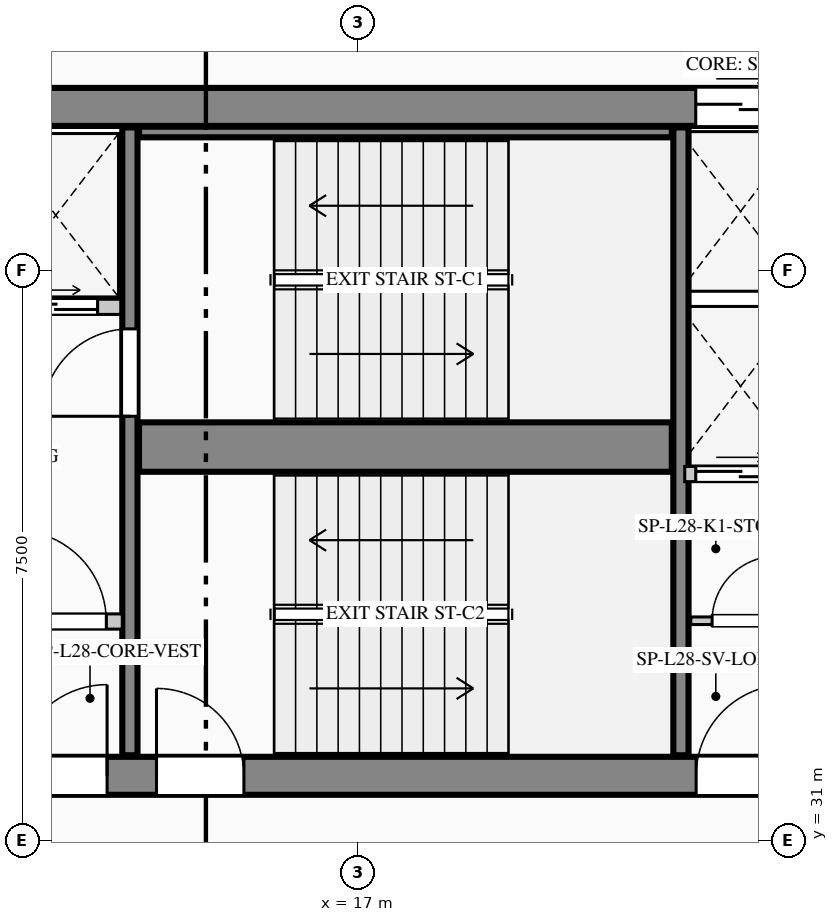
"""IFC4 building model, lengths in metres.
Left out: names, types, materials, properties, quantities, classifications, styles, units other than length and angle.
Written with IfcOpenShell. Run it as: python <this file> out.ifc"""

import sys

from ifc_helpers import new_model, si_unit, direction, frame, frame_2d, origin, place, context, subcontext, project, spatial, rectangle, extrude, element, fill, save


model = new_model("IFC4")
c1 = context("Model", 3, precision=1e-05, world=origin(), true_north=direction((0.0, 1.0)))
c2 = subcontext(c1, "Body", "Model", "MODEL_VIEW")
j1 = project(units=[si_unit("LENGTHUNIT", "METRE"), si_unit("PLANEANGLEUNIT", "RADIAN")], contexts=[c1])
p1 = place(None, origin())
s1 = spatial("IfcSite", under=j1, at=p1, CompositionType="ELEMENT")
p2 = place(p1, origin())
s2 = spatial("IfcBuilding", under=s1, at=p2, CompositionType="ELEMENT")
p3 = place(p2, frame((0.0, 0.0, 123.25)))
s3 = spatial("IfcBuildingStorey", under=s2, at=p3, CompositionType="ELEMENT", Elevation=123.25)
p4 = place(p3, frame((5.5, 40.65, 0.0), z_axis=(0.0, 0.0, 1.0), x_axis=(1.0, 0.0, 0.0)))
e1 = element("IfcWall", 1, at=p4, inside=s3, PredefinedType="SHEAR", context=c2, shape_type="SweptSolid", body=[
    extrude(rectangle(XDim=17.85, YDim=0.5, at=frame_2d((8.925, 0.0))), origin(), (0.0, 0.0, 1.0), 3.95),
])
p5 = place(p4, frame((15.945, 0.0, 0.0)))
e2 = element("IfcOpeningElement", 2, at=p5, cuts=e1, PredefinedType="OPENING", context=c2, shape_type="SweptSolid", body=[
    extrude(rectangle(XDim=1.18, YDim=2.25, at=frame_2d((0.59, 1.125))), frame((0.0, 0.26, 0.0), z_axis=(0.0, -1.0, 0.0), x_axis=(1.0, 0.0, 0.0)), (0.0, 0.0, 1.0), 0.52),
])
p6 = place(p3, frame((5.5, 31.85, 0.0), z_axis=(0.0, 0.0, 1.0), x_axis=(1.0, 0.0, 0.0)))
e3 = element("IfcWall", 3, at=p6, inside=s3, PredefinedType="SHEAR", context=c2, shape_type="SweptSolid", body=[
    extrude(rectangle(XDim=17.85, YDim=0.5, at=frame_2d((8.925, 0.0))), origin(), (0.0, 0.0, 1.0), 3.95),
])
p7 = place(p6, frame((3.15, 0.0, 0.0)))
e4 = element("IfcOpeningElement", 4, at=p7, cuts=e3, PredefinedType="OPENING", context=c2, shape_type="SweptSolid", body=[
    extrude(rectangle(XDim=1.2, YDim=2.2, at=frame_2d((0.6, 1.1))), frame((0.0, 0.26, 0.0), z_axis=(0.0, -1.0, 0.0), x_axis=(1.0, 0.0, 0.0)), (0.0, 0.0, 1.0), 0.52),
])
p8 = place(p6, frame((7.0, 0.0, 0.0)))
e5 = element("IfcOpeningElement", 5, at=p8, cuts=e3, PredefinedType="OPENING", context=c2, shape_type="SweptSolid", body=[
    extrude(rectangle(XDim=1.2, YDim=2.2, at=frame_2d((0.6, 1.1))), frame((0.0, 0.26, 0.0), z_axis=(0.0, -1.0, 0.0), x_axis=(1.0, 0.0, 0.0)), (0.0, 0.0, 1.0), 0.52),
])
p9 = place(p6, frame((8.85, 0.0, 0.0)))
e6 = element("IfcOpeningElement", 6, at=p9, cuts=e3, PredefinedType="OPENING", context=c2, shape_type="SweptSolid", body=[
    extrude(rectangle(XDim=1.15, YDim=2.2, at=frame_2d((0.575, 1.1))), frame((0.0, 0.26, 0.0), z_axis=(0.0, -1.0, 0.0), x_axis=(1.0, 0.0, 0.0)), (0.0, 0.0, 1.0), 0.52),
])
p10 = place(p6, frame((15.95, 0.0, 0.0)))
e7 = element("IfcOpeningElement", 7, at=p10, cuts=e3, PredefinedType="OPENING", context=c2, shape_type="SweptSolid", body=[
    extrude(rectangle(XDim=1.2, YDim=2.2, at=frame_2d((0.6, 1.1))), frame((0.0, 0.26, 0.0), z_axis=(0.0, -1.0, 0.0), x_axis=(1.0, 0.0, 0.0)), (0.0, 0.0, 1.0), 0.52),
])
p11 = place(p3, frame((14.0, 32.12, 0.0), z_axis=(0.0, 0.0, 1.0), x_axis=(0.0, 1.0, 0.0)))
e8 = element("IfcWall", 8, at=p11, inside=s3, PredefinedType="SHEAR", context=c2, shape_type="SweptSolid", body=[
    extrude(rectangle(XDim=8.26, YDim=0.2, at=frame_2d((4.13, 0.0))), origin(), (0.0, 0.0, 1.0), 3.95),
])
p12 = place(p11, frame((4.46, 0.0, 0.0)))
e9 = element("IfcOpeningElement", 9, at=p12, cuts=e8, PredefinedType="OPENING", context=c2, shape_type="SweptSolid", body=[
    extrude(rectangle(XDim=1.15, YDim=2.2, at=frame_2d((0.575, 1.1))), frame((0.0, 0.11, 0.0), z_axis=(0.0, -1.0, 0.0), x_axis=(1.0, 0.0, 0.0)), (0.0, 0.0, 1.0), 0.22),
])
p13 = place(p3, frame((14.12, 36.175, 0.0), z_axis=(0.0, 0.0, 1.0), x_axis=(1.0, 0.0, 0.0)))
e10 = element("IfcWall", 10, at=p13, inside=s3, PredefinedType="SHEAR", context=c2, shape_type="SweptSolid", body=[
    extrude(rectangle(XDim=7.01, YDim=0.65, at=frame_2d((3.505, 0.0))), origin(), (0.0, 0.0, 1.0), 3.95),
])
p14 = place(p3, frame((21.25, 32.12, 0.0), z_axis=(0.0, 0.0, 1.0), x_axis=(0.0, 1.0, 0.0)))
e11 = element("IfcWall", 11, at=p14, inside=s3, PredefinedType="SHEAR", context=c2, shape_type="SweptSolid", body=[
    extrude(rectangle(XDim=8.26, YDim=0.2, at=frame_2d((4.13, 0.0))), origin(), (0.0, 0.0, 1.0), 3.95),
])
p15 = place(p3, frame((14.12, 40.32, 0.0), z_axis=(0.0, 0.0, 1.0), x_axis=(1.0, 0.0, 0.0)))
e12 = element("IfcWall", 12, at=p15, inside=s3, PredefinedType="SHEAR", context=c2, shape_type="SweptSolid", body=[
    extrude(rectangle(XDim=7.01, YDim=0.14, at=frame_2d((3.505, 0.0))), origin(), (0.0, 0.0, 1.0), 3.95),
])
p16 = place(p3, frame((10.34, 38.02, 0.0), z_axis=(0.0, 0.0, 1.0), x_axis=(1.0, 0.0, 0.0)))
e13 = element("IfcWall", 13, at=p16, inside=s3, PredefinedType="PARTITIONING", context=c2, shape_type="SweptSolid", body=[
    extrude(rectangle(XDim=3.54, YDim=0.2, at=frame_2d((1.77, 0.0))), origin(), (0.0, 0.0, 1.0), 3.69),
])
p17 = place(p16, frame((0.285, 0.0, 0.0)))
e14 = element("IfcOpeningElement", 14, at=p17, cuts=e13, PredefinedType="OPENING", context=c2, shape_type="SweptSolid", body=[
    extrude(rectangle(XDim=1.1, YDim=2.2, at=frame_2d((0.55, 1.1))), frame((0.0, 0.11, 0.0), z_axis=(0.0, -1.0, 0.0), x_axis=(1.0, 0.0, 0.0)), (0.0, 0.0, 1.0), 0.22),
])
p18 = place(p16, frame((2.135, 0.0, 0.0)))
e15 = element("IfcOpeningElement", 15, at=p18, cuts=e13, PredefinedType="OPENING", context=c2, shape_type="SweptSolid", body=[
    extrude(rectangle(XDim=1.1, YDim=2.2, at=frame_2d((0.55, 1.1))), frame((0.0, 0.11, 0.0), z_axis=(0.0, -1.0, 0.0), x_axis=(1.0, 0.0, 0.0)), (0.0, 0.0, 1.0), 0.22),
])
p19 = place(p3, frame((10.34, 33.88, 0.0), z_axis=(0.0, 0.0, 1.0), x_axis=(1.0, 0.0, 0.0)))
e16 = element("IfcWall", 16, at=p19, inside=s3, PredefinedType="PARTITIONING", context=c2, shape_type="SweptSolid", body=[
    extrude(rectangle(XDim=3.56, YDim=0.2, at=frame_2d((1.78, 0.0))), origin(), (0.0, 0.0, 1.0), 3.69),
])
p20 = place(p19, frame((2.15, 0.0, 0.0)))
e17 = element("IfcOpeningElement", 17, at=p20, cuts=e16, PredefinedType="OPENING", context=c2, shape_type="SweptSolid", body=[
    extrude(rectangle(XDim=1.2, YDim=2.2, at=frame_2d((0.6, 1.1))), frame((0.0, 0.11, 0.0), z_axis=(0.0, -1.0, 0.0), x_axis=(1.0, 0.0, 0.0)), (0.0, 0.0, 1.0), 0.22),
])
p21 = place(p3, frame((21.38, 33.89, 0.0), z_axis=(0.0, 0.0, 1.0), x_axis=(1.0, 0.0, 0.0)))
e18 = element("IfcWall", 18, at=p21, inside=s3, PredefinedType="PARTITIONING", context=c2, shape_type="SweptSolid", body=[
    extrude(rectangle(XDim=1.42, YDim=0.1, at=frame_2d((0.71, 0.0))), origin(), (0.0, 0.0, 1.0), 3.69),
])
p22 = place(p21, frame((0.28, 0.0, 0.0)))
e19 = element("IfcOpeningElement", 19, at=p22, cuts=e18, PredefinedType="OPENING", context=c2, shape_type="SweptSolid", body=[
    extrude(rectangle(XDim=0.85, YDim=2.1, at=frame_2d((0.425, 1.05))), frame((0.0, 0.06, 0.0), z_axis=(0.0, -1.0, 0.0), x_axis=(1.0, 0.0, 0.0)), (0.0, 0.0, 1.0), 0.12),
])
p23 = place(p3, frame((21.3, 35.82, 0.0), z_axis=(0.0, 0.0, 1.0), x_axis=(1.0, 0.0, 0.0)))
e20 = element("IfcWall", 20, at=p23, inside=s3, PredefinedType="PARTITIONING", context=c2, shape_type="SweptSolid", body=[
    extrude(rectangle(XDim=1.5, YDim=0.2, at=frame_2d((0.75, 0.0))), origin(), (0.0, 0.0, 1.0), 3.69),
])
p24 = place(p23, frame((0.145, 0.0, 0.0)))
e21 = element("IfcOpeningElement", 21, at=p24, cuts=e20, PredefinedType="OPENING", context=c2, shape_type="SweptSolid", body=[
    extrude(rectangle(XDim=1.18, YDim=2.25, at=frame_2d((0.59, 1.125))), frame((0.0, 0.11, 0.0), z_axis=(0.0, -1.0, 0.0), x_axis=(1.0, 0.0, 0.0)), (0.0, 0.0, 1.0), 0.22),
])
p25 = place(p8, origin())
e22 = element("IfcDoor", 22, at=p25, inside=s3, OperationType="SINGLE_SWING_RIGHT", PredefinedType="DOOR", context=c2, shape_type="SweptSolid", body=[
    extrude(rectangle(XDim=1.2, YDim=2.2, at=frame_2d((0.6, 1.1))), frame((0.0, 0.025, 0.0), z_axis=(0.0, -1.0, 0.0), x_axis=(1.0, 0.0, 0.0)), (0.0, 0.0, 1.0), 0.05),
])
fill(e5, e22)
p26 = place(p9, origin())
e23 = element("IfcDoor", 23, at=p26, inside=s3, OperationType="SINGLE_SWING_LEFT", PredefinedType="DOOR", context=c2, shape_type="SweptSolid", body=[
    extrude(rectangle(XDim=1.15, YDim=2.2, at=frame_2d((0.575, 1.1))), frame((0.0, 0.025, 0.0), z_axis=(0.0, -1.0, 0.0), x_axis=(1.0, 0.0, 0.0)), (0.0, 0.0, 1.0), 0.05),
])
fill(e6, e23)
p27 = place(p10, origin())
e24 = element("IfcDoor", 24, at=p27, inside=s3, OperationType="SINGLE_SWING_RIGHT", PredefinedType="DOOR", context=c2, shape_type="SweptSolid", body=[
    extrude(rectangle(XDim=1.2, YDim=2.2, at=frame_2d((0.6, 1.1))), frame((0.0, 0.025, 0.0), z_axis=(0.0, -1.0, 0.0), x_axis=(1.0, 0.0, 0.0)), (0.0, 0.0, 1.0), 0.05),
])
fill(e7, e24)
p28 = place(p20, origin())
e25 = element("IfcDoor", 25, at=p28, inside=s3, OperationType="SINGLE_SWING_LEFT", PredefinedType="DOOR", context=c2, shape_type="SweptSolid", body=[
    extrude(rectangle(XDim=1.2, YDim=2.2, at=frame_2d((0.6, 1.1))), frame((0.0, 0.025, 0.0), z_axis=(0.0, -1.0, 0.0), x_axis=(1.0, 0.0, 0.0)), (0.0, 0.0, 1.0), 0.05),
])
fill(e17, e25)
p29 = place(p22, origin())
e26 = element("IfcDoor", 26, at=p29, inside=s3, OperationType="SINGLE_SWING_RIGHT", PredefinedType="DOOR", context=c2, shape_type="SweptSolid", body=[
    extrude(rectangle(XDim=0.85, YDim=2.1, at=frame_2d((0.425, 1.05))), frame((0.0, 0.025, 0.0), z_axis=(0.0, -1.0, 0.0), x_axis=(1.0, 0.0, 0.0)), (0.0, 0.0, 1.0), 0.05),
])
fill(e19, e26)
p30 = place(p12, origin())
e27 = element("IfcDoor", 27, at=p30, inside=s3, OperationType="SINGLE_SWING_LEFT", PredefinedType="DOOR", context=c2, shape_type="SweptSolid", body=[
    extrude(rectangle(XDim=1.15, YDim=2.2, at=frame_2d((0.575, 1.1))), frame((0.0, 0.025, 0.0), z_axis=(0.0, -1.0, 0.0), x_axis=(1.0, 0.0, 0.0)), (0.0, 0.0, 1.0), 0.05),
])
fill(e9, e27)
p31 = place(p18, origin())
e28 = element("IfcDoor", 28, at=p31, inside=s3, OperationType="DOUBLE_DOOR_SLIDING", PredefinedType="DOOR", context=c2, shape_type="SweptSolid", body=[
    extrude(rectangle(XDim=1.1, YDim=2.2, at=frame_2d((0.55, 1.1))), frame((0.0, 0.025, 0.0), z_axis=(0.0, -1.0, 0.0), x_axis=(1.0, 0.0, 0.0)), (0.0, 0.0, 1.0), 0.05),
])
fill(e15, e28)
p32 = place(p5, origin())
e29 = element("IfcDoor", 29, at=p32, inside=s3, OperationType="DOUBLE_DOOR_SLIDING", PredefinedType="DOOR", context=c2, shape_type="SweptSolid", body=[
    extrude(rectangle(XDim=1.18, YDim=2.25, at=frame_2d((0.59, 1.125))), frame((0.0, 0.025, 0.0), z_axis=(0.0, -1.0, 0.0), x_axis=(1.0, 0.0, 0.0)), (0.0, 0.0, 1.0), 0.05),
])
fill(e2, e29)
p33 = place(p24, origin())
e30 = element("IfcDoor", 30, at=p33, inside=s3, OperationType="DOUBLE_DOOR_SLIDING", PredefinedType="DOOR", context=c2, shape_type="SweptSolid", body=[
    extrude(rectangle(XDim=1.18, YDim=2.25, at=frame_2d((0.59, 1.125))), frame((0.0, 0.025, 0.0), z_axis=(0.0, -1.0, 0.0), x_axis=(1.0, 0.0, 0.0)), (0.0, 0.0, 1.0), 0.05),
])
fill(e21, e30)
save(model, sys.argv[1])
